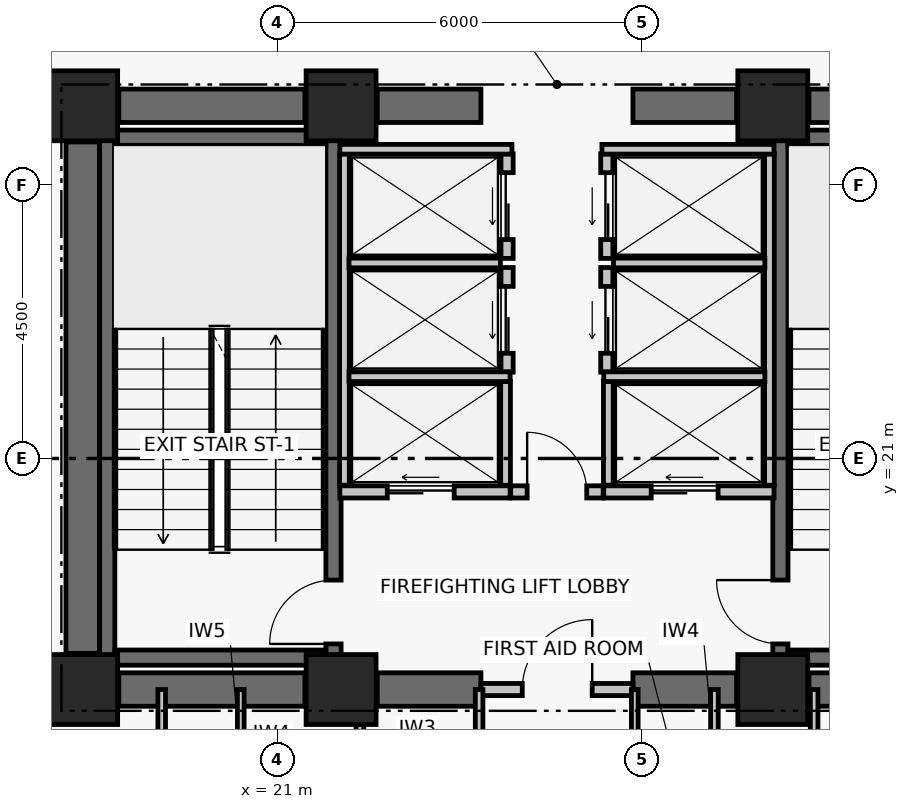
"""IFC4 building model, lengths in metres.
Left out: names, types, materials, properties, quantities, classifications, styles, units other than length and angle.
Written with IfcOpenShell. Run it as: python <this file> out.ifc"""

import sys

from ifc_helpers import new_model, si_unit, direction, frame, frame_2d, origin, origin_2d, place, context, subcontext, project, spatial, rectangle, extrude, element, fill, save


model = new_model("IFC4")
c1 = context("Model", 3, precision=1e-05, world=origin(), true_north=direction((0.0, 1.0)))
c2 = subcontext(c1, "Body", "Model", "MODEL_VIEW")
j1 = project(units=[si_unit("LENGTHUNIT", "METRE"), si_unit("PLANEANGLEUNIT", "RADIAN")], contexts=[c1])
p1 = place(None, origin())
s1 = spatial("IfcSite", under=j1, at=p1, CompositionType="ELEMENT")
p2 = place(p1, origin())
s2 = spatial("IfcBuilding", under=s1, at=p2, CompositionType="ELEMENT")
p3 = place(p2, frame((0.0, 0.0, 100.26)))
s3 = spatial("IfcBuildingStorey", under=s2, at=p3, CompositionType="ELEMENT", Elevation=100.26)
for number, where, z_axis, x_axis in (
    (1, (17.8, 17.2, 0.0), (0.0, 0.0, 1.0), (1.0, 0.0, 0.0)),
    (2, (22.05, 17.2, 0.0), (0.0, 0.0, 1.0), (1.0, 0.0, 0.0)),
    (3, (29.15, 17.2, 0.0), (0.0, 0.0, 1.0), (1.0, 0.0, 0.0)),
    (4, (17.8, 26.8, 0.0), (0.0, 0.0, 1.0), (1.0, 0.0, 0.0)),
    (5, (22.05, 26.8, 0.0), (0.0, 0.0, 1.0), (1.0, 0.0, 0.0)),
    (6, (29.15, 26.8, 0.0), (0.0, 0.0, 1.0), (1.0, 0.0, 0.0)),
):
    element("IfcColumn", number, at=place(p3, frame(where, z_axis=z_axis, x_axis=x_axis)), inside=s3, PredefinedType="COLUMN", context=c2, shape_type="SweptSolid", body=[
        extrude(rectangle(XDim=1.15, YDim=1.15, at=origin_2d()), origin(), (0.0, 0.0, 1.0), 3.72),
    ])
p4 = place(p3, frame((18.395, 17.2, 0.0), z_axis=(0.0, 0.0, 1.0), x_axis=(1.0, 0.0, 0.0)))
e7 = element("IfcWall", 7, at=p4, inside=s3, PredefinedType="SHEAR", context=c2, shape_type="SweptSolid", body=[
    extrude(rectangle(XDim=3.06, YDim=0.55, at=frame_2d((1.53, 0.0))), origin(), (0.0, 0.0, 1.0), 3.44),
])
p5 = place(p3, frame((22.645, 17.2, 0.0), z_axis=(0.0, 0.0, 1.0), x_axis=(1.0, 0.0, 0.0)))
e8 = element("IfcWall", 8, at=p5, inside=s3, PredefinedType="SHEAR", context=c2, shape_type="SweptSolid", body=[
    extrude(rectangle(XDim=1.705, YDim=0.55, at=frame_2d((0.853, 0.0))), origin(), (0.0, 0.0, 1.0), 3.44),
])
p6 = place(p3, frame((26.85, 17.2, 0.0), z_axis=(0.0, 0.0, 1.0), x_axis=(1.0, 0.0, 0.0)))
e9 = element("IfcWall", 9, at=p6, inside=s3, PredefinedType="SHEAR", context=c2, shape_type="SweptSolid", body=[
    extrude(rectangle(XDim=1.705, YDim=0.55, at=frame_2d((0.853, 0.0))), origin(), (0.0, 0.0, 1.0), 3.44),
])
p7 = place(p3, frame((29.745, 17.2, 0.0), z_axis=(0.0, 0.0, 1.0), x_axis=(1.0, 0.0, 0.0)))
e10 = element("IfcWall", 10, at=p7, inside=s3, PredefinedType="SHEAR", context=c2, shape_type="SweptSolid", body=[
    extrude(rectangle(XDim=3.06, YDim=0.55, at=frame_2d((1.53, 0.0))), origin(), (0.0, 0.0, 1.0), 3.44),
])
p8 = place(p3, frame((18.395, 26.8, 0.0), z_axis=(0.0, 0.0, 1.0), x_axis=(1.0, 0.0, 0.0)))
e11 = element("IfcWall", 11, at=p8, inside=s3, PredefinedType="SHEAR", context=c2, shape_type="SweptSolid", body=[
    extrude(rectangle(XDim=3.06, YDim=0.55, at=frame_2d((1.53, 0.0))), origin(), (0.0, 0.0, 1.0), 3.44),
])
p9 = place(p3, frame((22.645, 26.8, 0.0), z_axis=(0.0, 0.0, 1.0), x_axis=(1.0, 0.0, 0.0)))
e12 = element("IfcWall", 12, at=p9, inside=s3, PredefinedType="SHEAR", context=c2, shape_type="SweptSolid", body=[
    extrude(rectangle(XDim=1.705, YDim=0.55, at=frame_2d((0.853, 0.0))), origin(), (0.0, 0.0, 1.0), 3.44),
])
p10 = place(p3, frame((26.85, 26.8, 0.0), z_axis=(0.0, 0.0, 1.0), x_axis=(1.0, 0.0, 0.0)))
e13 = element("IfcWall", 13, at=p10, inside=s3, PredefinedType="SHEAR", context=c2, shape_type="SweptSolid", body=[
    extrude(rectangle(XDim=1.705, YDim=0.55, at=frame_2d((0.853, 0.0))), origin(), (0.0, 0.0, 1.0), 3.44),
])
p11 = place(p3, frame((29.745, 26.8, 0.0), z_axis=(0.0, 0.0, 1.0), x_axis=(1.0, 0.0, 0.0)))
e14 = element("IfcWall", 14, at=p11, inside=s3, PredefinedType="SHEAR", context=c2, shape_type="SweptSolid", body=[
    extrude(rectangle(XDim=3.06, YDim=0.55, at=frame_2d((1.53, 0.0))), origin(), (0.0, 0.0, 1.0), 3.44),
])
p12 = place(p3, frame((17.8, 17.795, 0.0), z_axis=(0.0, 0.0, 1.0), x_axis=(0.0, 1.0, 0.0)))
e15 = element("IfcWall", 15, at=p12, inside=s3, PredefinedType="SHEAR", context=c2, shape_type="SweptSolid", body=[
    extrude(rectangle(XDim=8.41, YDim=0.55, at=frame_2d((4.205, 0.0))), origin(), (0.0, 0.0, 1.0), 3.44),
])
p13 = place(p3, frame((18.204, 17.6, 0.0), z_axis=(0.0, 0.0, 1.0), x_axis=(0.0, 1.0, 0.0)))
e16 = element("IfcWall", 16, at=p13, inside=s3, PredefinedType="SHEAR", context=c2, shape_type="SweptSolid", body=[
    extrude(rectangle(XDim=8.8, YDim=0.25, at=frame_2d((4.4, 0.0))), origin(), (0.0, 0.0, 1.0), 3.44),
])
p14 = place(p3, frame((21.925, 17.6, 0.0), z_axis=(0.0, 0.0, 1.0), x_axis=(0.0, 1.0, 0.0)))
e17 = element("IfcWall", 17, at=p14, inside=s3, PredefinedType="SHEAR", context=c2, shape_type="SweptSolid", body=[
    extrude(rectangle(XDim=8.8, YDim=0.25, at=frame_2d((4.4, 0.0))), origin(), (0.0, 0.0, 1.0), 3.44),
])
p15 = place(p14, frame((0.35, 0.0, 0.0)))
e18 = element("IfcOpeningElement", 18, at=p15, cuts=e17, PredefinedType="OPENING", context=c2, shape_type="SweptSolid", body=[
    extrude(rectangle(XDim=1.05, YDim=2.08, at=frame_2d((0.525, 1.04))), frame((0.0, 0.135, 0.0), z_axis=(0.0, -1.0, 0.0), x_axis=(1.0, 0.0, 0.0)), (0.0, 0.0, 1.0), 0.27),
])
for number, where, z_axis, x_axis in (
    (19, (18.329, 17.725, 0.0), (0.0, 0.0, 1.0), (1.0, 0.0, 0.0)),
    (20, (18.329, 26.275, 0.0), (0.0, 0.0, 1.0), (1.0, 0.0, 0.0)),
):
    element("IfcWall", number, at=place(p3, frame(where, z_axis=z_axis, x_axis=x_axis)), inside=s3, PredefinedType="SHEAR", context=c2, shape_type="SweptSolid", body=[
        extrude(rectangle(XDim=3.471, YDim=0.25, at=frame_2d((1.735, 0.0))), origin(), (0.0, 0.0, 1.0), 3.44),
    ])
p16 = place(p3, frame((29.275, 17.6, 0.0), z_axis=(0.0, 0.0, 1.0), x_axis=(0.0, 1.0, 0.0)))
e21 = element("IfcWall", 21, at=p16, inside=s3, PredefinedType="SHEAR", context=c2, shape_type="SweptSolid", body=[
    extrude(rectangle(XDim=8.8, YDim=0.25, at=frame_2d((4.4, 0.0))), origin(), (0.0, 0.0, 1.0), 3.44),
])
p17 = place(p16, frame((0.35, 0.0, 0.0)))
e22 = element("IfcOpeningElement", 22, at=p17, cuts=e21, PredefinedType="OPENING", context=c2, shape_type="SweptSolid", body=[
    extrude(rectangle(XDim=1.05, YDim=2.08, at=frame_2d((0.525, 1.04))), frame((0.0, 0.135, 0.0), z_axis=(0.0, -1.0, 0.0), x_axis=(1.0, 0.0, 0.0)), (0.0, 0.0, 1.0), 0.27),
])
for number, where, z_axis, x_axis in (
    (23, (29.4, 17.725, 0.0), (0.0, 0.0, 1.0), (1.0, 0.0, 0.0)),
    (24, (29.4, 26.275, 0.0), (0.0, 0.0, 1.0), (1.0, 0.0, 0.0)),
):
    element("IfcWall", number, at=place(p3, frame(where, z_axis=z_axis, x_axis=x_axis)), inside=s3, PredefinedType="SHEAR", context=c2, shape_type="SweptSolid", body=[
        extrude(rectangle(XDim=3.471, YDim=0.25, at=frame_2d((1.736, 0.0))), origin(), (0.0, 0.0, 1.0), 3.44),
    ])
p18 = place(p3, frame((24.35, 17.2, 0.0), z_axis=(0.0, 0.0, 1.0), x_axis=(1.0, 0.0, 0.0)))
e25 = element("IfcWall", 25, at=p18, inside=s3, PredefinedType="PARTITIONING", context=c2, shape_type="SweptSolid", body=[
    extrude(rectangle(XDim=2.5, YDim=0.2, at=frame_2d((1.25, 0.0))), origin(), (0.0, 0.0, 1.0), 2.57),
])
p19 = place(p18, frame((0.68, 0.0, 0.0)))
e26 = element("IfcOpeningElement", 26, at=p19, cuts=e25, PredefinedType="OPENING", context=c2, shape_type="SweptSolid", body=[
    extrude(rectangle(XDim=1.15, YDim=2.08, at=frame_2d((0.575, 1.04))), frame((0.0, 0.11, 0.0), z_axis=(0.0, -1.0, 0.0), x_axis=(1.0, 0.0, 0.0)), (0.0, 0.0, 1.0), 0.22),
])
p20 = place(p3, frame((24.84, 20.45, 0.0), z_axis=(0.0, 0.0, 1.0), x_axis=(1.0, 0.0, 0.0)))
e27 = element("IfcWall", 27, at=p20, inside=s3, PredefinedType="PARTITIONING", context=c2, shape_type="SweptSolid", body=[
    extrude(rectangle(XDim=1.52, YDim=0.2, at=frame_2d((0.76, 0.0))), origin(), (0.0, 0.0, 1.0), 3.44),
])
p21 = place(p20, frame((0.27, 0.0, 0.0)))
e28 = element("IfcOpeningElement", 28, at=p21, cuts=e27, PredefinedType="OPENING", context=c2, shape_type="SweptSolid", body=[
    extrude(rectangle(XDim=0.98, YDim=2.06, at=frame_2d((0.49, 1.03))), frame((0.0, 0.11, 0.0), z_axis=(0.0, -1.0, 0.0), x_axis=(1.0, 0.0, 0.0)), (0.0, 0.0, 1.0), 0.22),
])
p22 = place(p3, frame((22.03, 20.45, 0.0), z_axis=(0.0, 0.0, 1.0), x_axis=(1.0, 0.0, 0.0)))
e29 = element("IfcWall", 29, at=p22, inside=s3, PredefinedType="PARTITIONING", context=c2, shape_type="SweptSolid", body=[
    extrude(rectangle(XDim=2.8, YDim=0.2, at=frame_2d((1.4, 0.0))), origin(), (0.0, 0.0, 1.0), 3.44),
])
p23 = place(p22, frame((0.78, 0.0, 0.0)))
e30 = element("IfcOpeningElement", 30, at=p23, cuts=e29, PredefinedType="OPENING", context=c2, shape_type="SweptSolid", body=[
    extrude(rectangle(XDim=1.1, YDim=2.08, at=frame_2d((0.55, 1.04))), frame((0.0, 0.11, 0.0), z_axis=(0.0, -1.0, 0.0), x_axis=(1.0, 0.0, 0.0)), (0.0, 0.0, 1.0), 0.22),
])
p24 = place(p3, frame((26.37, 20.45, 0.0), z_axis=(0.0, 0.0, 1.0), x_axis=(1.0, 0.0, 0.0)))
e31 = element("IfcWall", 31, at=p24, inside=s3, PredefinedType="PARTITIONING", context=c2, shape_type="SweptSolid", body=[
    extrude(rectangle(XDim=2.8, YDim=0.2, at=frame_2d((1.4, 0.0))), origin(), (0.0, 0.0, 1.0), 3.44),
])
p25 = place(p24, frame((0.78, 0.0, 0.0)))
e32 = element("IfcOpeningElement", 32, at=p25, cuts=e31, PredefinedType="OPENING", context=c2, shape_type="SweptSolid", body=[
    extrude(rectangle(XDim=1.1, YDim=2.08, at=frame_2d((0.55, 1.04))), frame((0.0, 0.11, 0.0), z_axis=(0.0, -1.0, 0.0), x_axis=(1.0, 0.0, 0.0)), (0.0, 0.0, 1.0), 0.22),
])
p26 = place(p3, frame((24.78, 22.42, 0.0), z_axis=(0.0, 0.0, 1.0), x_axis=(0.0, 1.0, 0.0)))
e33 = element("IfcWall", 33, at=p26, inside=s3, PredefinedType="PARTITIONING", context=c2, shape_type="SweptSolid", body=[
    extrude(rectangle(XDim=1.72, YDim=0.2, at=frame_2d((0.86, 0.0))), origin(), (0.0, 0.0, 1.0), 3.44),
])
p27 = place(p26, frame((0.31, 0.0, 0.0)))
e34 = element("IfcOpeningElement", 34, at=p27, cuts=e33, PredefinedType="OPENING", context=c2, shape_type="SweptSolid", body=[
    extrude(rectangle(XDim=1.1, YDim=2.08, at=frame_2d((0.55, 1.04))), frame((0.0, 0.11, 0.0), z_axis=(0.0, -1.0, 0.0), x_axis=(1.0, 0.0, 0.0)), (0.0, 0.0, 1.0), 0.22),
])
p28 = place(p3, frame((24.78, 24.29, 0.0), z_axis=(0.0, 0.0, 1.0), x_axis=(0.0, 1.0, 0.0)))
e35 = element("IfcWall", 35, at=p28, inside=s3, PredefinedType="PARTITIONING", context=c2, shape_type="SweptSolid", body=[
    extrude(rectangle(XDim=1.72, YDim=0.2, at=frame_2d((0.86, 0.0))), origin(), (0.0, 0.0, 1.0), 3.44),
])
p29 = place(p28, frame((0.31, 0.0, 0.0)))
e36 = element("IfcOpeningElement", 36, at=p29, cuts=e35, PredefinedType="OPENING", context=c2, shape_type="SweptSolid", body=[
    extrude(rectangle(XDim=1.1, YDim=2.08, at=frame_2d((0.55, 1.04))), frame((0.0, 0.11, 0.0), z_axis=(0.0, -1.0, 0.0), x_axis=(1.0, 0.0, 0.0)), (0.0, 0.0, 1.0), 0.22),
])
p30 = place(p3, frame((26.42, 22.42, 0.0), z_axis=(0.0, 0.0, 1.0), x_axis=(0.0, 1.0, 0.0)))
e37 = element("IfcWall", 37, at=p30, inside=s3, PredefinedType="PARTITIONING", context=c2, shape_type="SweptSolid", body=[
    extrude(rectangle(XDim=1.72, YDim=0.2, at=frame_2d((0.86, 0.0))), origin(), (0.0, 0.0, 1.0), 3.44),
])
p31 = place(p30, frame((0.31, 0.0, 0.0)))
e38 = element("IfcOpeningElement", 38, at=p31, cuts=e37, PredefinedType="OPENING", context=c2, shape_type="SweptSolid", body=[
    extrude(rectangle(XDim=1.1, YDim=2.08, at=frame_2d((0.55, 1.04))), frame((0.0, 0.11, 0.0), z_axis=(0.0, -1.0, 0.0), x_axis=(1.0, 0.0, 0.0)), (0.0, 0.0, 1.0), 0.22),
])
p32 = place(p3, frame((26.42, 24.29, 0.0), z_axis=(0.0, 0.0, 1.0), x_axis=(0.0, 1.0, 0.0)))
e39 = element("IfcWall", 39, at=p32, inside=s3, PredefinedType="PARTITIONING", context=c2, shape_type="SweptSolid", body=[
    extrude(rectangle(XDim=1.72, YDim=0.2, at=frame_2d((0.86, 0.0))), origin(), (0.0, 0.0, 1.0), 3.44),
])
p33 = place(p32, frame((0.31, 0.0, 0.0)))
e40 = element("IfcOpeningElement", 40, at=p33, cuts=e39, PredefinedType="OPENING", context=c2, shape_type="SweptSolid", body=[
    extrude(rectangle(XDim=1.1, YDim=2.08, at=frame_2d((0.55, 1.04))), frame((0.0, 0.11, 0.0), z_axis=(0.0, -1.0, 0.0), x_axis=(1.0, 0.0, 0.0)), (0.0, 0.0, 1.0), 0.22),
])
p34 = place(p3, frame((22.105, 20.56, 0.0), z_axis=(0.0, 0.0, 1.0), x_axis=(0.0, 1.0, 0.0)))
e41 = element("IfcWall", 41, at=p34, inside=s3, PredefinedType="PARTITIONING", context=c2, shape_type="SweptSolid", body=[
    extrude(rectangle(XDim=5.45, YDim=0.16, at=frame_2d((2.725, 0.0))), origin(), (0.0, 0.0, 1.0), 3.44),
])
p35 = place(p3, frame((24.755, 20.56, 0.0), z_axis=(0.0, 0.0, 1.0), x_axis=(0.0, 1.0, 0.0)))
e42 = element("IfcWall", 42, at=p35, inside=s3, PredefinedType="PARTITIONING", context=c2, shape_type="SweptSolid", body=[
    extrude(rectangle(XDim=1.71, YDim=0.16, at=frame_2d((0.855, 0.0))), origin(), (0.0, 0.0, 1.0), 3.44),
])
p36 = place(p3, frame((22.18, 22.345, 0.0), z_axis=(0.0, 0.0, 1.0), x_axis=(1.0, 0.0, 0.0)))
e43 = element("IfcWall", 43, at=p36, inside=s3, PredefinedType="PARTITIONING", context=c2, shape_type="SweptSolid", body=[
    extrude(rectangle(XDim=2.65, YDim=0.16, at=frame_2d((1.325, 0.0))), origin(), (0.0, 0.0, 1.0), 3.44),
])
p37 = place(p3, frame((22.18, 24.215, 0.0), z_axis=(0.0, 0.0, 1.0), x_axis=(1.0, 0.0, 0.0)))
e44 = element("IfcWall", 44, at=p37, inside=s3, PredefinedType="PARTITIONING", context=c2, shape_type="SweptSolid", body=[
    extrude(rectangle(XDim=2.49, YDim=0.16, at=frame_2d((1.245, 0.0))), origin(), (0.0, 0.0, 1.0), 3.44),
])
p38 = place(p3, frame((22.03, 26.085, 0.0), z_axis=(0.0, 0.0, 1.0), x_axis=(1.0, 0.0, 0.0)))
e45 = element("IfcWall", 45, at=p38, inside=s3, PredefinedType="PARTITIONING", context=c2, shape_type="SweptSolid", body=[
    extrude(rectangle(XDim=2.83, YDim=0.16, at=frame_2d((1.415, 0.0))), origin(), (0.0, 0.0, 1.0), 3.44),
])
p39 = place(p3, frame((29.095, 20.56, 0.0), z_axis=(0.0, 0.0, 1.0), x_axis=(0.0, 1.0, 0.0)))
e46 = element("IfcWall", 46, at=p39, inside=s3, PredefinedType="PARTITIONING", context=c2, shape_type="SweptSolid", body=[
    extrude(rectangle(XDim=5.45, YDim=0.16, at=frame_2d((2.725, 0.0))), origin(), (0.0, 0.0, 1.0), 3.44),
])
p40 = place(p3, frame((26.445, 20.56, 0.0), z_axis=(0.0, 0.0, 1.0), x_axis=(0.0, 1.0, 0.0)))
e47 = element("IfcWall", 47, at=p40, inside=s3, PredefinedType="PARTITIONING", context=c2, shape_type="SweptSolid", body=[
    extrude(rectangle(XDim=1.71, YDim=0.16, at=frame_2d((0.855, 0.0))), origin(), (0.0, 0.0, 1.0), 3.44),
])
p41 = place(p3, frame((26.37, 22.345, 0.0), z_axis=(0.0, 0.0, 1.0), x_axis=(1.0, 0.0, 0.0)))
e48 = element("IfcWall", 48, at=p41, inside=s3, PredefinedType="PARTITIONING", context=c2, shape_type="SweptSolid", body=[
    extrude(rectangle(XDim=2.65, YDim=0.16, at=frame_2d((1.325, 0.0))), origin(), (0.0, 0.0, 1.0), 3.44),
])
p42 = place(p3, frame((26.53, 24.215, 0.0), z_axis=(0.0, 0.0, 1.0), x_axis=(1.0, 0.0, 0.0)))
e49 = element("IfcWall", 49, at=p42, inside=s3, PredefinedType="PARTITIONING", context=c2, shape_type="SweptSolid", body=[
    extrude(rectangle(XDim=2.49, YDim=0.16, at=frame_2d((1.245, 0.0))), origin(), (0.0, 0.0, 1.0), 3.44),
])
p43 = place(p3, frame((26.34, 26.085, 0.0), z_axis=(0.0, 0.0, 1.0), x_axis=(1.0, 0.0, 0.0)))
e50 = element("IfcWall", 50, at=p43, inside=s3, PredefinedType="PARTITIONING", context=c2, shape_type="SweptSolid", body=[
    extrude(rectangle(XDim=2.83, YDim=0.16, at=frame_2d((1.415, 0.0))), origin(), (0.0, 0.0, 1.0), 3.44),
])
p44 = place(p3, frame((19.1, 14.95, 0.0), z_axis=(0.0, 0.0, 1.0), x_axis=(0.0, 1.0, 0.0)))
e51 = element("IfcWall", 51, at=p44, inside=s3, PredefinedType="PARTITIONING", context=c2, shape_type="SweptSolid", body=[
    extrude(rectangle(XDim=2.25, YDim=0.125, at=frame_2d((1.125, 0.0))), origin(), (0.0, 0.0, 1.0), 2.57),
])
p45 = place(p3, frame((20.4, 14.95, 0.0), z_axis=(0.0, 0.0, 1.0), x_axis=(0.0, 1.0, 0.0)))
e52 = element("IfcWall", 52, at=p45, inside=s3, PredefinedType="PARTITIONING", context=c2, shape_type="SweptSolid", body=[
    extrude(rectangle(XDim=2.25, YDim=0.11, at=frame_2d((1.125, 0.0))), origin(), (0.0, 0.0, 1.0), 2.57),
])
p46 = place(p3, frame((22.36, 14.95, 0.0), z_axis=(0.0, 0.0, 1.0), x_axis=(0.0, 1.0, 0.0)))
e53 = element("IfcWall", 53, at=p46, inside=s3, PredefinedType="PARTITIONING", context=c2, shape_type="SweptSolid", body=[
    extrude(rectangle(XDim=2.25, YDim=0.125, at=frame_2d((1.125, 0.0))), origin(), (0.0, 0.0, 1.0), 2.17),
])
p47 = place(p3, frame((24.32, 14.95, 0.0), z_axis=(0.0, 0.0, 1.0), x_axis=(0.0, 1.0, 0.0)))
e54 = element("IfcWall", 54, at=p47, inside=s3, PredefinedType="PARTITIONING", context=c2, shape_type="SweptSolid", body=[
    extrude(rectangle(XDim=2.25, YDim=0.125, at=frame_2d((1.125, 0.0))), origin(), (0.0, 0.0, 1.0), 2.57),
])
p48 = place(p3, frame((26.88, 14.95, 0.0), z_axis=(0.0, 0.0, 1.0), x_axis=(0.0, 1.0, 0.0)))
e55 = element("IfcWall", 55, at=p48, inside=s3, PredefinedType="PARTITIONING", context=c2, shape_type="SweptSolid", body=[
    extrude(rectangle(XDim=2.25, YDim=0.11, at=frame_2d((1.125, 0.0))), origin(), (0.0, 0.0, 1.0), 2.57),
])
for number, where, z_axis, x_axis in (
    (56, (28.19, 14.95, 0.0), (0.0, 0.0, 1.0), (0.0, 1.0, 0.0)),
    (57, (29.83, 14.95, 0.0), (0.0, 0.0, 1.0), (0.0, 1.0, 0.0)),
):
    element("IfcWall", number, at=place(p3, frame(where, z_axis=z_axis, x_axis=x_axis)), inside=s3, PredefinedType="PARTITIONING", context=c2, shape_type="SweptSolid", body=[
        extrude(rectangle(XDim=2.25, YDim=0.125, at=frame_2d((1.125, 0.0))), origin(), (0.0, 0.0, 1.0), 2.57),
    ])
p49 = place(p15, origin())
e58 = element("IfcDoor", 58, at=p49, inside=s3, OperationType="SINGLE_SWING_LEFT", PredefinedType="DOOR", context=c2, shape_type="SweptSolid", body=[
    extrude(rectangle(XDim=1.05, YDim=2.08, at=frame_2d((0.525, 1.04))), frame((0.0, 0.025, 0.0), z_axis=(0.0, -1.0, 0.0), x_axis=(1.0, 0.0, 0.0)), (0.0, 0.0, 1.0), 0.05),
])
fill(e18, e58)
p50 = place(p17, origin())
e59 = element("IfcDoor", 59, at=p50, inside=s3, OperationType="SINGLE_SWING_RIGHT", PredefinedType="DOOR", context=c2, shape_type="SweptSolid", body=[
    extrude(rectangle(XDim=1.05, YDim=2.08, at=frame_2d((0.525, 1.04))), frame((0.0, 0.025, 0.0), z_axis=(0.0, -1.0, 0.0), x_axis=(1.0, 0.0, 0.0)), (0.0, 0.0, 1.0), 0.05),
])
fill(e22, e59)
p51 = place(p19, origin())
e60 = element("IfcDoor", 60, at=p51, inside=s3, OperationType="SINGLE_SWING_RIGHT", PredefinedType="DOOR", context=c2, shape_type="SweptSolid", body=[
    extrude(rectangle(XDim=1.15, YDim=2.08, at=frame_2d((0.575, 1.04))), frame((0.0, 0.025, 0.0), z_axis=(0.0, -1.0, 0.0), x_axis=(1.0, 0.0, 0.0)), (0.0, 0.0, 1.0), 0.05),
])
fill(e26, e60)
p52 = place(p21, origin())
e61 = element("IfcDoor", 61, at=p52, inside=s3, OperationType="SINGLE_SWING_LEFT", PredefinedType="DOOR", context=c2, shape_type="SweptSolid", body=[
    extrude(rectangle(XDim=0.98, YDim=2.06, at=frame_2d((0.49, 1.03))), frame((0.0, 0.025, 0.0), z_axis=(0.0, -1.0, 0.0), x_axis=(1.0, 0.0, 0.0)), (0.0, 0.0, 1.0), 0.05),
])
fill(e28, e61)
p53 = place(p23, origin())
e62 = element("IfcDoor", 62, at=p53, inside=s3, OperationType="DOUBLE_DOOR_SLIDING", PredefinedType="DOOR", context=c2, shape_type="SweptSolid", body=[
    extrude(rectangle(XDim=1.1, YDim=2.08, at=frame_2d((0.55, 1.04))), frame((0.0, 0.025, 0.0), z_axis=(0.0, -1.0, 0.0), x_axis=(1.0, 0.0, 0.0)), (0.0, 0.0, 1.0), 0.05),
])
fill(e30, e62)
p54 = place(p25, origin())
e63 = element("IfcDoor", 63, at=p54, inside=s3, OperationType="DOUBLE_DOOR_SLIDING", PredefinedType="DOOR", context=c2, shape_type="SweptSolid", body=[
    extrude(rectangle(XDim=1.1, YDim=2.08, at=frame_2d((0.55, 1.04))), frame((0.0, 0.025, 0.0), z_axis=(0.0, -1.0, 0.0), x_axis=(1.0, 0.0, 0.0)), (0.0, 0.0, 1.0), 0.05),
])
fill(e32, e63)
p55 = place(p27, origin())
e64 = element("IfcDoor", 64, at=p55, inside=s3, OperationType="DOUBLE_DOOR_SLIDING", PredefinedType="DOOR", context=c2, shape_type="SweptSolid", body=[
    extrude(rectangle(XDim=1.1, YDim=2.08, at=frame_2d((0.55, 1.04))), frame((0.0, 0.025, 0.0), z_axis=(0.0, -1.0, 0.0), x_axis=(1.0, 0.0, 0.0)), (0.0, 0.0, 1.0), 0.05),
])
fill(e34, e64)
p56 = place(p29, origin())
e65 = element("IfcDoor", 65, at=p56, inside=s3, OperationType="DOUBLE_DOOR_SLIDING", PredefinedType="DOOR", context=c2, shape_type="SweptSolid", body=[
    extrude(rectangle(XDim=1.1, YDim=2.08, at=frame_2d((0.55, 1.04))), frame((0.0, 0.025, 0.0), z_axis=(0.0, -1.0, 0.0), x_axis=(1.0, 0.0, 0.0)), (0.0, 0.0, 1.0), 0.05),
])
fill(e36, e65)
p57 = place(p31, origin())
e66 = element("IfcDoor", 66, at=p57, inside=s3, OperationType="DOUBLE_DOOR_SLIDING", PredefinedType="DOOR", context=c2, shape_type="SweptSolid", body=[
    extrude(rectangle(XDim=1.1, YDim=2.08, at=frame_2d((0.55, 1.04))), frame((0.0, 0.025, 0.0), z_axis=(0.0, -1.0, 0.0), x_axis=(1.0, 0.0, 0.0)), (0.0, 0.0, 1.0), 0.05),
])
fill(e38, e66)
p58 = place(p33, origin())
e67 = element("IfcDoor", 67, at=p58, inside=s3, OperationType="DOUBLE_DOOR_SLIDING", PredefinedType="DOOR", context=c2, shape_type="SweptSolid", body=[
    extrude(rectangle(XDim=1.1, YDim=2.08, at=frame_2d((0.55, 1.04))), frame((0.0, 0.025, 0.0), z_axis=(0.0, -1.0, 0.0), x_axis=(1.0, 0.0, 0.0)), (0.0, 0.0, 1.0), 0.05),
])
fill(e40, e67)
save(model, sys.argv[1])
